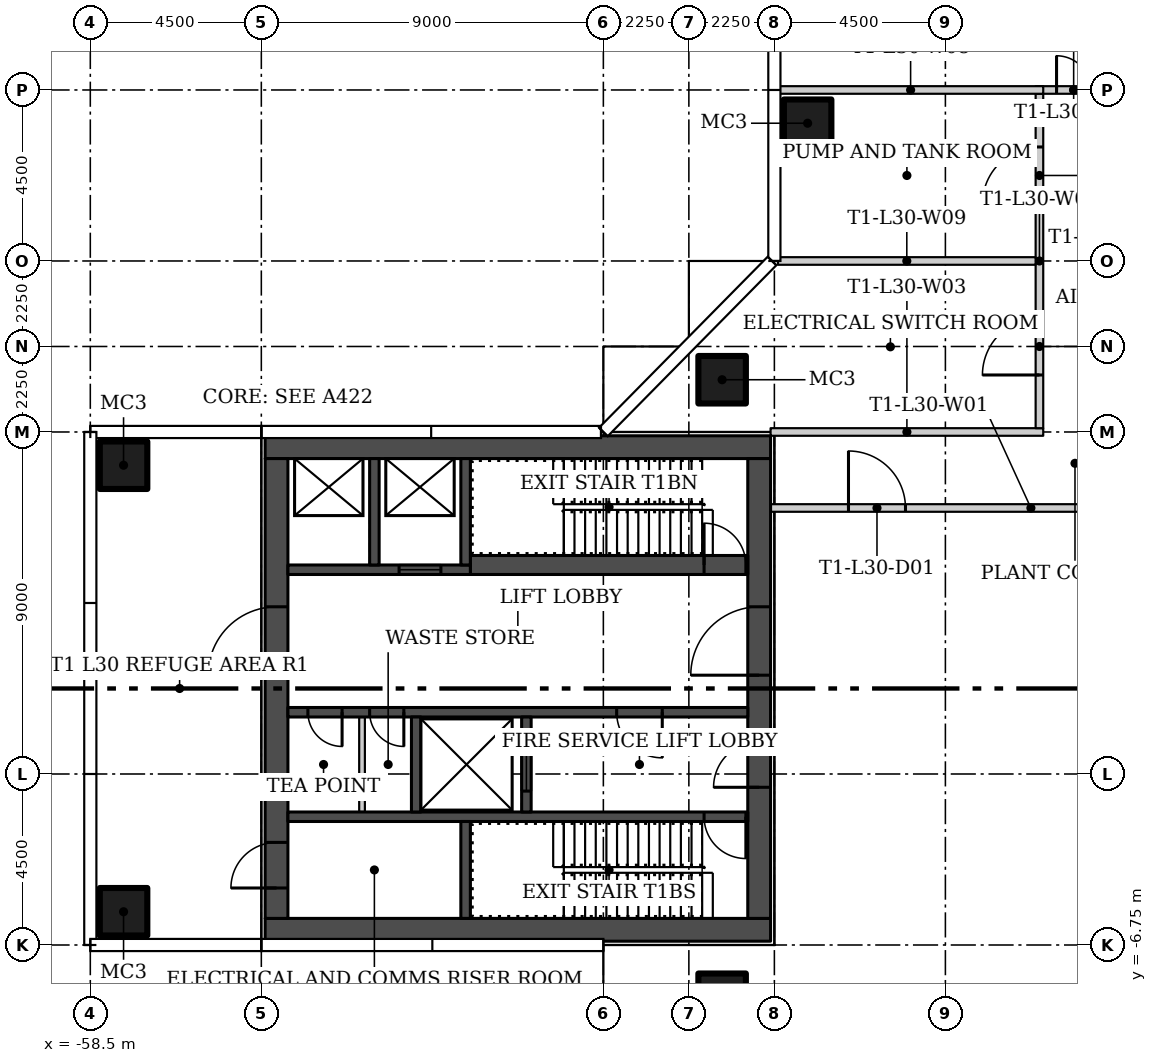
"""IFC4 building model, lengths in metres.
Left out: names, types, materials, properties, quantities, classifications, styles, units other than length and angle.
Written with IfcOpenShell. Run it as: python <this file> out.ifc"""

import sys

from ifc_helpers import new_model, si_unit, direction, frame, frame_2d, origin, origin_2d, place, context, subcontext, project, spatial, rectangle, hollow_rectangle, extrude, element, fill, save


model = new_model("IFC4")
c1 = context("Model", 3, precision=1e-05, world=origin(), true_north=direction((0.0, 1.0)))
c2 = subcontext(c1, "Body", "Model", "MODEL_VIEW")
j1 = project(units=[si_unit("LENGTHUNIT", "METRE"), si_unit("PLANEANGLEUNIT", "RADIAN")], contexts=[c1])
p1 = place(None, origin())
s1 = spatial("IfcSite", under=j1, at=p1, CompositionType="ELEMENT")
p2 = place(p1, origin())
s2 = spatial("IfcBuilding", under=s1, at=p2, CompositionType="ELEMENT")
p3 = place(p2, frame((0.0, 0.0, 128.7)))
s3 = spatial("IfcBuildingStorey", under=s2, at=p3, CompositionType="ELEMENT", Elevation=128.7)
for number, where in (
    (1, (-41.875, 8.125, 0.0)),
    (2, (-41.875, -8.125, 0.0)),
    (3, (-57.625, -5.875, 0.0)),
    (4, (-57.625, 5.875, 0.0)),
    (5, (-39.625, 14.875, 0.0)),
):
    element("IfcColumn", number, at=place(p3, frame(where)), inside=s3, PredefinedType="COLUMN", context=c2, shape_type="SweptSolid", body=[
        extrude(hollow_rectangle(XDim=1.25, YDim=1.25, WallThickness=0.05, at=origin_2d()), origin(), (0.0, 0.0, 1.0), 4.4),
    ])
p4 = place(p3, frame((-40.6, 4.75, 0.0)))
e6 = element("IfcWall", 6, at=p4, inside=s3, PredefinedType="PARTITIONING", context=c2, shape_type="SweptSolid", body=[
    extrude(rectangle(XDim=13.7, YDim=0.2, at=frame_2d((6.85, 0.0))), origin(), (0.0, 0.0, 1.0), 4.4),
])
p5 = place(p4, frame((2.05, 0.0, 0.0)))
e7 = element("IfcOpeningElement", 7, at=p5, cuts=e6, PredefinedType="OPENING", context=c2, shape_type="SweptSolid", body=[
    extrude(rectangle(XDim=1.5, YDim=2.4, at=frame_2d((0.75, 1.2))), frame((0.0, 0.11, 0.0), z_axis=(0.0, -1.0, 0.0), x_axis=(1.0, 0.0, 0.0)), (0.0, 0.0, 1.0), 0.22),
])
p6 = place(p4, frame((10.15, 0.0, 0.0)))
e8 = element("IfcOpeningElement", 8, at=p6, cuts=e6, PredefinedType="OPENING", context=c2, shape_type="SweptSolid", body=[
    extrude(rectangle(XDim=1.5, YDim=2.4, at=frame_2d((0.75, 1.2))), frame((0.0, 0.11, 0.0), z_axis=(0.0, -1.0, 0.0), x_axis=(1.0, 0.0, 0.0)), (0.0, 0.0, 1.0), 0.22),
])
p7 = place(p3, frame((-40.6, 6.75, 0.0)))
e9 = element("IfcWall", 9, at=p7, inside=s3, PredefinedType="PARTITIONING", context=c2, shape_type="SweptSolid", body=[
    extrude(rectangle(XDim=7.175, YDim=0.2, at=frame_2d((3.587, 0.0))), origin(), (0.0, 0.0, 1.0), 4.4),
])
p8 = place(p3, frame((-33.525, 6.85, 0.0), z_axis=(0.0, 0.0, 1.0), x_axis=(0.0, 1.0, 0.0)))
e10 = element("IfcWall", 10, at=p8, inside=s3, PredefinedType="PARTITIONING", context=c2, shape_type="SweptSolid", body=[
    extrude(rectangle(XDim=8.8, YDim=0.2, at=frame_2d((4.4, 0.0))), origin(), (0.0, 0.0, 1.0), 4.4),
])
p9 = place(p8, frame((1.4, 0.0, 0.0)))
e11 = element("IfcOpeningElement", 11, at=p9, cuts=e10, PredefinedType="OPENING", context=c2, shape_type="SweptSolid", body=[
    extrude(rectangle(XDim=1.5, YDim=2.4, at=frame_2d((0.75, 1.2))), frame((0.0, 0.11, 0.0), z_axis=(0.0, -1.0, 0.0), x_axis=(1.0, 0.0, 0.0)), (0.0, 0.0, 1.0), 0.22),
])
p10 = place(p8, frame((5.9, 0.0, 0.0)))
e12 = element("IfcOpeningElement", 12, at=p10, cuts=e10, PredefinedType="OPENING", context=c2, shape_type="SweptSolid", body=[
    extrude(rectangle(XDim=1.5, YDim=2.4, at=frame_2d((0.75, 1.2))), frame((0.0, 0.11, 0.0), z_axis=(0.0, -1.0, 0.0), x_axis=(1.0, 0.0, 0.0)), (0.0, 0.0, 1.0), 0.22),
])
p11 = place(p3, frame((-33.625, 15.75, 0.0)))
e13 = element("IfcWall", 13, at=p11, inside=s3, PredefinedType="PARTITIONING", context=c2, shape_type="SweptSolid", body=[
    extrude(rectangle(XDim=2.001, YDim=0.2, at=frame_2d((1.0, 0.0))), origin(), (0.0, 0.0, 1.0), 4.4),
])
p12 = place(p11, frame((0.55, 0.0, 0.0)))
e14 = element("IfcOpeningElement", 14, at=p12, cuts=e13, PredefinedType="OPENING", context=c2, shape_type="SweptSolid", body=[
    extrude(rectangle(XDim=0.9, YDim=2.4, at=frame_2d((0.45, 1.2))), frame((0.0, 0.11, 0.0), z_axis=(0.0, -1.0, 0.0), x_axis=(1.0, 0.0, 0.0)), (0.0, 0.0, 1.0), 0.22),
])
p13 = place(p3, frame((-33.425, 15.75, 0.0), z_axis=(0.0, 0.0, 1.0), x_axis=(-1.0, 0.0, 0.0)))
e15 = element("IfcWall", 15, at=p13, inside=s3, PredefinedType="PARTITIONING", context=c2, shape_type="SweptSolid", body=[
    extrude(rectangle(XDim=6.98, YDim=0.2, at=frame_2d((3.49, 0.0))), origin(), (0.0, 0.0, 1.0), 4.4),
])
p14 = place(p3, frame((-33.625, 11.25, 0.0), z_axis=(0.0, 0.0, 1.0), x_axis=(-1.0, 0.0, 0.0)))
e16 = element("IfcWall", 16, at=p14, inside=s3, PredefinedType="PARTITIONING", context=c2, shape_type="SweptSolid", body=[
    extrude(rectangle(XDim=6.78, YDim=0.2, at=frame_2d((3.39, 0.0))), origin(), (0.0, 0.0, 1.0), 4.4),
])
for number, where, z_axis, x_axis in (
    (17, (-40.6, -6.35, 0.0), (0.0, 0.0, 1.0), (-1.0, 0.0, 0.0)),
    (18, (-40.6, 6.35, 0.0), (0.0, 0.0, 1.0), (-1.0, 0.0, 0.0)),
):
    element("IfcWall", number, at=place(p3, frame(where, z_axis=z_axis, x_axis=x_axis)), inside=s3, PredefinedType="SHEAR", context=c2, shape_type="SweptSolid", body=[
        extrude(rectangle(XDim=13.3, YDim=0.6, at=frame_2d((6.65, 0.0))), origin(), (0.0, 0.0, 1.0), 4.4),
    ])
p15 = place(p3, frame((-40.9, -6.05, 0.0), z_axis=(0.0, 0.0, 1.0), x_axis=(0.0, 1.0, 0.0)))
e19 = element("IfcWall", 19, at=p15, inside=s3, PredefinedType="SHEAR", context=c2, shape_type="SweptSolid", body=[
    extrude(rectangle(XDim=12.1, YDim=0.6, at=frame_2d((6.05, 0.0))), origin(), (0.0, 0.0, 1.0), 4.4),
])
p16 = place(p15, frame((3.45, 0.0, 0.0)))
e20 = element("IfcOpeningElement", 20, at=p16, cuts=e19, PredefinedType="OPENING", context=c2, shape_type="SweptSolid", body=[
    extrude(rectangle(XDim=1.2, YDim=2.1, at=frame_2d((0.6, 1.05))), frame((0.0, 0.31, 0.0), z_axis=(0.0, -1.0, 0.0), x_axis=(1.0, 0.0, 0.0)), (0.0, 0.0, 1.0), 0.62),
])
p17 = place(p15, frame((6.4, 0.0, 0.0)))
e21 = element("IfcOpeningElement", 21, at=p17, cuts=e19, PredefinedType="OPENING", context=c2, shape_type="SweptSolid", body=[
    extrude(rectangle(XDim=1.8, YDim=2.4, at=frame_2d((0.9, 1.2))), frame((0.0, 0.31, 0.0), z_axis=(0.0, -1.0, 0.0), x_axis=(1.0, 0.0, 0.0)), (0.0, 0.0, 1.0), 0.62),
])
p18 = place(p3, frame((-53.6, -6.05, 0.0), z_axis=(0.0, 0.0, 1.0), x_axis=(0.0, 1.0, 0.0)))
e22 = element("IfcWall", 22, at=p18, inside=s3, PredefinedType="SHEAR", context=c2, shape_type="SweptSolid", body=[
    extrude(rectangle(XDim=12.1, YDim=0.6, at=frame_2d((6.05, 0.0))), origin(), (0.0, 0.0, 1.0), 4.4),
])
p19 = place(p18, frame((0.8, 0.0, 0.0)))
e23 = element("IfcOpeningElement", 23, at=p19, cuts=e22, PredefinedType="OPENING", context=c2, shape_type="SweptSolid", body=[
    extrude(rectangle(XDim=1.2, YDim=2.1, at=frame_2d((0.6, 1.05))), frame((0.0, 0.31, 0.0), z_axis=(0.0, -1.0, 0.0), x_axis=(1.0, 0.0, 0.0)), (0.0, 0.0, 1.0), 0.62),
])
p20 = place(p18, frame((6.4, 0.0, 0.0)))
e24 = element("IfcOpeningElement", 24, at=p20, cuts=e22, PredefinedType="OPENING", context=c2, shape_type="SweptSolid", body=[
    extrude(rectangle(XDim=1.8, YDim=2.4, at=frame_2d((0.9, 1.2))), frame((0.0, 0.31, 0.0), z_axis=(0.0, -1.0, 0.0), x_axis=(1.0, 0.0, 0.0)), (0.0, 0.0, 1.0), 0.62),
])
p21 = place(p3, frame((-41.2, -3.375, 0.0), z_axis=(0.0, 0.0, 1.0), x_axis=(-1.0, 0.0, 0.0)))
e25 = element("IfcWall", 25, at=p21, inside=s3, PredefinedType="SHEAR", context=c2, shape_type="SweptSolid", body=[
    extrude(rectangle(XDim=12.1, YDim=0.25, at=frame_2d((6.05, 0.0))), origin(), (0.0, 0.0, 1.0), 4.4),
])
p22 = place(p21, frame((0.05, 0.0, 0.0)))
e26 = element("IfcOpeningElement", 26, at=p22, cuts=e25, PredefinedType="OPENING", context=c2, shape_type="SweptSolid", body=[
    extrude(rectangle(XDim=1.1, YDim=2.1, at=frame_2d((0.55, 1.05))), frame((0.0, 0.135, 0.0), z_axis=(0.0, -1.0, 0.0), x_axis=(1.0, 0.0, 0.0)), (0.0, 0.0, 1.0), 0.27),
])
p23 = place(p3, frame((-48.625, -6.05, 0.0), z_axis=(0.0, 0.0, 1.0), x_axis=(0.0, 1.0, 0.0)))
e27 = element("IfcWall", 27, at=p23, inside=s3, PredefinedType="SHEAR", context=c2, shape_type="SweptSolid", body=[
    extrude(rectangle(XDim=2.55, YDim=0.25, at=frame_2d((1.275, 0.0))), origin(), (0.0, 0.0, 1.0), 4.4),
])
p24 = place(p3, frame((-41.2, -0.625, 0.0), z_axis=(0.0, 0.0, 1.0), x_axis=(-1.0, 0.0, 0.0)))
e28 = element("IfcWall", 28, at=p24, inside=s3, PredefinedType="SHEAR", context=c2, shape_type="SweptSolid", body=[
    extrude(rectangle(XDim=12.1, YDim=0.25, at=frame_2d((6.05, 0.0))), origin(), (0.0, 0.0, 1.0), 4.4),
])
p25 = place(p24, frame((2.25, 0.0, 0.0)))
e29 = element("IfcOpeningElement", 29, at=p25, cuts=e28, PredefinedType="OPENING", context=c2, shape_type="SweptSolid", body=[
    extrude(rectangle(XDim=1.2, YDim=2.1, at=frame_2d((0.6, 1.05))), frame((0.0, 0.135, 0.0), z_axis=(0.0, -1.0, 0.0), x_axis=(1.0, 0.0, 0.0)), (0.0, 0.0, 1.0), 0.27),
])
p26 = place(p24, frame((9.05, 0.0, 0.0)))
e30 = element("IfcOpeningElement", 30, at=p26, cuts=e28, PredefinedType="OPENING", context=c2, shape_type="SweptSolid", body=[
    extrude(rectangle(XDim=0.9, YDim=2.1, at=frame_2d((0.45, 1.05))), frame((0.0, 0.135, 0.0), z_axis=(0.0, -1.0, 0.0), x_axis=(1.0, 0.0, 0.0)), (0.0, 0.0, 1.0), 0.27),
])
p27 = place(p24, frame((10.675, 0.0, 0.0)))
e31 = element("IfcOpeningElement", 31, at=p27, cuts=e28, PredefinedType="OPENING", context=c2, shape_type="SweptSolid", body=[
    extrude(rectangle(XDim=0.9, YDim=2.1, at=frame_2d((0.45, 1.05))), frame((0.0, 0.135, 0.0), z_axis=(0.0, -1.0, 0.0), x_axis=(1.0, 0.0, 0.0)), (0.0, 0.0, 1.0), 0.27),
])
p28 = place(p3, frame((-47.025, -3.25, 0.0), z_axis=(0.0, 0.0, 1.0), x_axis=(0.0, 1.0, 0.0)))
e32 = element("IfcWall", 32, at=p28, inside=s3, PredefinedType="SHEAR", context=c2, shape_type="SweptSolid", body=[
    extrude(rectangle(XDim=2.5, YDim=0.25, at=frame_2d((1.25, 0.0))), origin(), (0.0, 0.0, 1.0), 4.4),
])
p29 = place(p28, frame((0.55, 0.0, 0.0)))
e33 = element("IfcOpeningElement", 33, at=p29, cuts=e32, PredefinedType="OPENING", context=c2, shape_type="SweptSolid", body=[
    extrude(rectangle(XDim=1.4, YDim=2.4, at=frame_2d((0.7, 1.2))), frame((0.0, 0.135, 0.0), z_axis=(0.0, -1.0, 0.0), x_axis=(1.0, 0.0, 0.0)), (0.0, 0.0, 1.0), 0.27),
])
p30 = place(p3, frame((-49.925, -3.25, 0.0), z_axis=(0.0, 0.0, 1.0), x_axis=(0.0, 1.0, 0.0)))
e34 = element("IfcWall", 34, at=p30, inside=s3, PredefinedType="SHEAR", context=c2, shape_type="SweptSolid", body=[
    extrude(rectangle(XDim=2.5, YDim=0.25, at=frame_2d((1.25, 0.0))), origin(), (0.0, 0.0, 1.0), 4.4),
])
p31 = place(p3, frame((-51.35, -3.25, 0.0), z_axis=(0.0, 0.0, 1.0), x_axis=(0.0, 1.0, 0.0)))
e35 = element("IfcWall", 35, at=p31, inside=s3, PredefinedType="PARTITIONING", context=c2, shape_type="SweptSolid", body=[
    extrude(rectangle(XDim=2.5, YDim=0.15, at=frame_2d((1.25, 0.0))), origin(), (0.0, 0.0, 1.0), 4.4),
])
p32 = place(p3, frame((-48.5, 3.25, 0.0)))
e36 = element("IfcWall", 36, at=p32, inside=s3, PredefinedType="SHEAR", context=c2, shape_type="SweptSolid", body=[
    extrude(rectangle(XDim=7.3, YDim=0.5, at=frame_2d((3.65, 0.0))), origin(), (0.0, 0.0, 1.0), 4.4),
])
p33 = place(p32, frame((6.15, 0.0, 0.0)))
e37 = element("IfcOpeningElement", 37, at=p33, cuts=e36, PredefinedType="OPENING", context=c2, shape_type="SweptSolid", body=[
    extrude(rectangle(XDim=1.1, YDim=2.1, at=frame_2d((0.55, 1.05))), frame((0.0, 0.26, 0.0), z_axis=(0.0, -1.0, 0.0), x_axis=(1.0, 0.0, 0.0)), (0.0, 0.0, 1.0), 0.52),
])
p34 = place(p3, frame((-48.5, 3.125, 0.0), z_axis=(0.0, 0.0, 1.0), x_axis=(-1.0, 0.0, 0.0)))
e38 = element("IfcWall", 38, at=p34, inside=s3, PredefinedType="SHEAR", context=c2, shape_type="SweptSolid", body=[
    extrude(rectangle(XDim=4.8, YDim=0.25, at=frame_2d((2.4, 0.0))), origin(), (0.0, 0.0, 1.0), 4.4),
])
p35 = place(p34, frame((0.775, 0.0, 0.0)))
e39 = element("IfcOpeningElement", 39, at=p35, cuts=e38, PredefinedType="OPENING", context=c2, shape_type="SweptSolid", body=[
    extrude(rectangle(XDim=1.1, YDim=2.1, at=frame_2d((0.55, 1.05))), frame((0.0, 0.135, 0.0), z_axis=(0.0, -1.0, 0.0), x_axis=(1.0, 0.0, 0.0)), (0.0, 0.0, 1.0), 0.27),
])
for number, where, z_axis, x_axis in (
    (40, (-48.625, 3.25, 0.0), (0.0, 0.0, 1.0), (0.0, 1.0, 0.0)),
    (41, (-51.025, 3.25, 0.0), (0.0, 0.0, 1.0), (0.0, 1.0, 0.0)),
):
    element("IfcWall", number, at=place(p3, frame(where, z_axis=z_axis, x_axis=x_axis)), inside=s3, PredefinedType="SHEAR", context=c2, shape_type="SweptSolid", body=[
        extrude(rectangle(XDim=2.8, YDim=0.25, at=frame_2d((1.4, 0.0))), origin(), (0.0, 0.0, 1.0), 4.4),
    ])
p36 = place(p5, origin())
e42 = element("IfcDoor", 42, at=p36, inside=s3, OperationType="DOUBLE_DOOR_SINGLE_SWING", PredefinedType="DOOR", context=c2, shape_type="SweptSolid", body=[
    extrude(rectangle(XDim=1.5, YDim=2.4, at=frame_2d((0.75, 1.2))), frame((0.0, 0.025, 0.0), z_axis=(0.0, -1.0, 0.0), x_axis=(1.0, 0.0, 0.0)), (0.0, 0.0, 1.0), 0.05),
])
fill(e7, e42)
p37 = place(p9, origin())
e43 = element("IfcDoor", 43, at=p37, inside=s3, OperationType="DOUBLE_DOOR_SINGLE_SWING", PredefinedType="DOOR", context=c2, shape_type="SweptSolid", body=[
    extrude(rectangle(XDim=1.5, YDim=2.4, at=frame_2d((0.75, 1.2))), frame((0.0, 0.025, 0.0), z_axis=(0.0, -1.0, 0.0), x_axis=(1.0, 0.0, 0.0)), (0.0, 0.0, 1.0), 0.05),
])
fill(e11, e43)
p38 = place(p10, origin())
e44 = element("IfcDoor", 44, at=p38, inside=s3, OperationType="DOUBLE_DOOR_SINGLE_SWING", PredefinedType="DOOR", context=c2, shape_type="SweptSolid", body=[
    extrude(rectangle(XDim=1.5, YDim=2.4, at=frame_2d((0.75, 1.2))), frame((0.0, 0.025, 0.0), z_axis=(0.0, -1.0, 0.0), x_axis=(1.0, 0.0, 0.0)), (0.0, 0.0, 1.0), 0.05),
])
fill(e12, e44)
p39 = place(p12, origin())
e45 = element("IfcDoor", 45, at=p39, inside=s3, OperationType="SINGLE_SWING_RIGHT", PredefinedType="DOOR", context=c2, shape_type="SweptSolid", body=[
    extrude(rectangle(XDim=0.9, YDim=2.4, at=frame_2d((0.45, 1.2))), frame((0.0, 0.025, 0.0), z_axis=(0.0, -1.0, 0.0), x_axis=(1.0, 0.0, 0.0)), (0.0, 0.0, 1.0), 0.05),
])
fill(e14, e45)
p40 = place(p16, origin())
e46 = element("IfcDoor", 46, at=p40, inside=s3, OperationType="SINGLE_SWING_LEFT", PredefinedType="DOOR", context=c2, shape_type="SweptSolid", body=[
    extrude(rectangle(XDim=1.2, YDim=2.1, at=frame_2d((0.6, 1.05))), frame((0.0, 0.025, 0.0), z_axis=(0.0, -1.0, 0.0), x_axis=(1.0, 0.0, 0.0)), (0.0, 0.0, 1.0), 0.05),
])
fill(e20, e46)
p41 = place(p17, origin())
e47 = element("IfcDoor", 47, at=p41, inside=s3, OperationType="DOUBLE_DOOR_SINGLE_SWING", PredefinedType="DOOR", context=c2, shape_type="SweptSolid", body=[
    extrude(rectangle(XDim=1.8, YDim=2.4, at=frame_2d((0.9, 1.2))), frame((0.0, 0.025, 0.0), z_axis=(0.0, -1.0, 0.0), x_axis=(1.0, 0.0, 0.0)), (0.0, 0.0, 1.0), 0.05),
])
fill(e21, e47)
p42 = place(p19, origin())
e48 = element("IfcDoor", 48, at=p42, inside=s3, OperationType="SINGLE_SWING_LEFT", PredefinedType="DOOR", context=c2, shape_type="SweptSolid", body=[
    extrude(rectangle(XDim=1.2, YDim=2.1, at=frame_2d((0.6, 1.05))), frame((0.0, 0.025, 0.0), z_axis=(0.0, -1.0, 0.0), x_axis=(1.0, 0.0, 0.0)), (0.0, 0.0, 1.0), 0.05),
])
fill(e23, e48)
p43 = place(p20, origin())
e49 = element("IfcDoor", 49, at=p43, inside=s3, OperationType="DOUBLE_DOOR_SINGLE_SWING", PredefinedType="DOOR", context=c2, shape_type="SweptSolid", body=[
    extrude(rectangle(XDim=1.8, YDim=2.4, at=frame_2d((0.9, 1.2))), frame((0.0, 0.025, 0.0), z_axis=(0.0, -1.0, 0.0), x_axis=(1.0, 0.0, 0.0)), (0.0, 0.0, 1.0), 0.05),
])
fill(e24, e49)
p44 = place(p22, origin())
e50 = element("IfcDoor", 50, at=p44, inside=s3, OperationType="SINGLE_SWING_LEFT", PredefinedType="DOOR", context=c2, shape_type="SweptSolid", body=[
    extrude(rectangle(XDim=1.1, YDim=2.1, at=frame_2d((0.55, 1.05))), frame((0.0, 0.025, 0.0), z_axis=(0.0, -1.0, 0.0), x_axis=(1.0, 0.0, 0.0)), (0.0, 0.0, 1.0), 0.05),
])
fill(e26, e50)
p45 = place(p25, origin())
e51 = element("IfcDoor", 51, at=p45, inside=s3, OperationType="SINGLE_SWING_LEFT", PredefinedType="DOOR", context=c2, shape_type="SweptSolid", body=[
    extrude(rectangle(XDim=1.2, YDim=2.1, at=frame_2d((0.6, 1.05))), frame((0.0, 0.025, 0.0), z_axis=(0.0, -1.0, 0.0), x_axis=(1.0, 0.0, 0.0)), (0.0, 0.0, 1.0), 0.05),
])
fill(e29, e51)
p46 = place(p26, origin())
e52 = element("IfcDoor", 52, at=p46, inside=s3, OperationType="SINGLE_SWING_RIGHT", PredefinedType="DOOR", context=c2, shape_type="SweptSolid", body=[
    extrude(rectangle(XDim=0.9, YDim=2.1, at=frame_2d((0.45, 1.05))), frame((0.0, 0.025, 0.0), z_axis=(0.0, -1.0, 0.0), x_axis=(1.0, 0.0, 0.0)), (0.0, 0.0, 1.0), 0.05),
])
fill(e30, e52)
p47 = place(p27, origin())
e53 = element("IfcDoor", 53, at=p47, inside=s3, OperationType="SINGLE_SWING_RIGHT", PredefinedType="DOOR", context=c2, shape_type="SweptSolid", body=[
    extrude(rectangle(XDim=0.9, YDim=2.1, at=frame_2d((0.45, 1.05))), frame((0.0, 0.025, 0.0), z_axis=(0.0, -1.0, 0.0), x_axis=(1.0, 0.0, 0.0)), (0.0, 0.0, 1.0), 0.05),
])
fill(e31, e53)
p48 = place(p29, origin())
e54 = element("IfcDoor", 54, at=p48, inside=s3, OperationType="SLIDING_TO_LEFT", PredefinedType="DOOR", context=c2, shape_type="SweptSolid", body=[
    extrude(rectangle(XDim=1.4, YDim=2.4, at=frame_2d((0.7, 1.2))), frame((0.0, 0.025, 0.0), z_axis=(0.0, -1.0, 0.0), x_axis=(1.0, 0.0, 0.0)), (0.0, 0.0, 1.0), 0.05),
])
fill(e33, e54)
p49 = place(p33, origin())
e55 = element("IfcDoor", 55, at=p49, inside=s3, OperationType="SINGLE_SWING_RIGHT", PredefinedType="DOOR", context=c2, shape_type="SweptSolid", body=[
    extrude(rectangle(XDim=1.1, YDim=2.1, at=frame_2d((0.55, 1.05))), frame((0.0, 0.025, 0.0), z_axis=(0.0, -1.0, 0.0), x_axis=(1.0, 0.0, 0.0)), (0.0, 0.0, 1.0), 0.05),
])
fill(e37, e55)
p50 = place(p35, origin())
e56 = element("IfcDoor", 56, at=p50, inside=s3, OperationType="SLIDING_TO_LEFT", PredefinedType="DOOR", context=c2, shape_type="SweptSolid", body=[
    extrude(rectangle(XDim=1.1, YDim=2.1, at=frame_2d((0.55, 1.05))), frame((0.0, 0.025, 0.0), z_axis=(0.0, -1.0, 0.0), x_axis=(1.0, 0.0, 0.0)), (0.0, 0.0, 1.0), 0.05),
])
fill(e39, e56)
save(model, sys.argv[1])
